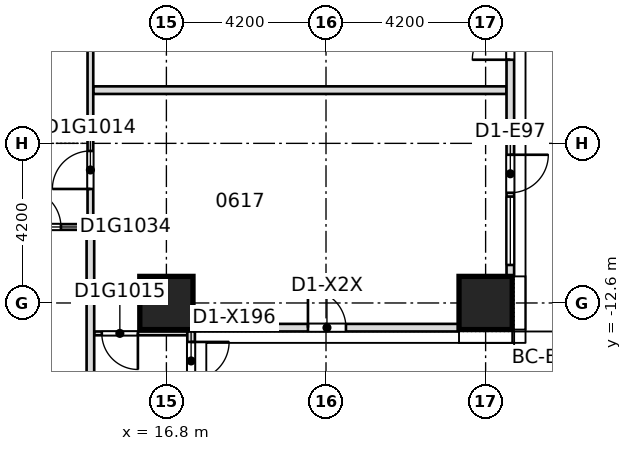
"""IFC4 building model, lengths in metres.
Left out: names, types, materials, properties, quantities, classifications, styles, units other than length and angle.
Written with IfcOpenShell. Run it as: python <this file> out.ifc"""

import sys

from ifc_helpers import new_model, si_unit, direction, frame, frame_2d, origin, origin_2d, place, context, subcontext, project, spatial, rectangle, extrude, element, fill, save


model = new_model("IFC4")
c1 = context("Model", 3, precision=1e-05, world=origin(), true_north=direction((0.0, 1.0)))
c2 = subcontext(c1, "Body", "Model", "MODEL_VIEW")
j1 = project(units=[si_unit("LENGTHUNIT", "METRE"), si_unit("PLANEANGLEUNIT", "RADIAN")], contexts=[c1])
p1 = place(None, origin())
s1 = spatial("IfcSite", under=j1, at=p1, CompositionType="ELEMENT")
p2 = place(p1, origin())
s2 = spatial("IfcBuilding", under=s1, at=p2, CompositionType="ELEMENT")
p3 = place(p2, frame((0.0, 0.0, 34.5)))
s3 = spatial("IfcBuildingStorey", under=s2, at=p3, CompositionType="ELEMENT", Elevation=34.5)
for number, where, z_axis, x_axis in (
    (1, (16.8, -12.6, -0.32), (0.0, 0.0, 1.0), (1.0, 0.0, 0.0)),
    (2, (25.2, -12.6, -0.32), (0.0, 0.0, 1.0), (1.0, 0.0, 0.0)),
):
    element("IfcColumn", number, at=place(p3, frame(where, z_axis=z_axis, x_axis=x_axis)), inside=s3, PredefinedType="COLUMN", context=c2, shape_type="SweptSolid", body=[
        extrude(rectangle(XDim=1.4, YDim=1.4, at=origin_2d()), origin(), (0.0, 0.0, 1.0), 3.45),
    ])
p4 = place(p3, frame((14.9, -13.4, 0.0), z_axis=(0.0, 0.0, 1.0), x_axis=(1.0, 0.0, 0.0)))
e3 = element("IfcWall", 3, at=p4, inside=s3, PredefinedType="PARTITIONING", context=c2, shape_type="SweptSolid", body=[
    extrude(rectangle(XDim=2.45, YDim=0.1, at=frame_2d((1.225, 0.0))), origin(), (0.0, 0.0, 1.0), 3.13),
])
p5 = place(p4, frame((0.2, 0.0, 0.0)))
e4 = element("IfcOpeningElement", 4, at=p5, cuts=e3, PredefinedType="OPENING", context=c2, shape_type="SweptSolid", body=[
    extrude(rectangle(XDim=0.95, YDim=2.1, at=frame_2d((0.475, 1.05))), frame((0.0, 0.06, 0.0), z_axis=(0.0, -1.0, 0.0), x_axis=(1.0, 0.0, 0.0)), (0.0, 0.0, 1.0), 0.12),
])
p6 = place(p3, frame((-14.9, -10.6, 0.0), z_axis=(0.0, 0.0, 1.0), x_axis=(1.0, 0.0, 0.0)))
e5 = element("IfcWall", 5, at=p6, inside=s3, PredefinedType="PARTITIONING", context=c2, shape_type="SweptSolid", body=[
    extrude(rectangle(XDim=29.8, YDim=0.15, at=frame_2d((14.9, 0.0))), origin(), (0.0, 0.0, 1.0), 3.13),
])
p7 = place(p6, frame((9.225, 0.0, 0.0)))
e6 = element("IfcOpeningElement", 6, at=p7, cuts=e5, PredefinedType="OPENING", context=c2, shape_type="SweptSolid", body=[
    extrude(rectangle(XDim=0.95, YDim=2.1, at=frame_2d((0.475, 1.05))), frame((0.0, 0.085, 0.0), z_axis=(0.0, -1.0, 0.0), x_axis=(1.0, 0.0, 0.0)), (0.0, 0.0, 1.0), 0.17),
])
p8 = place(p6, frame((19.625, 0.0, 0.0)))
e7 = element("IfcOpeningElement", 7, at=p8, cuts=e5, PredefinedType="OPENING", context=c2, shape_type="SweptSolid", body=[
    extrude(rectangle(XDim=0.95, YDim=2.1, at=frame_2d((0.475, 1.05))), frame((0.0, 0.085, 0.0), z_axis=(0.0, -1.0, 0.0), x_axis=(1.0, 0.0, 0.0)), (0.0, 0.0, 1.0), 0.17),
])
p9 = place(p6, frame((3.95, 0.0, 0.0)))
e8 = element("IfcOpeningElement", 8, at=p9, cuts=e5, PredefinedType="OPENING", context=c2, shape_type="SweptSolid", body=[
    extrude(rectangle(XDim=1.1, YDim=2.1, at=frame_2d((0.55, 1.05))), frame((0.0, 0.085, 0.0), z_axis=(0.0, -1.0, 0.0), x_axis=(1.0, 0.0, 0.0)), (0.0, 0.0, 1.0), 0.17),
])
p10 = place(p6, frame((15.5, 0.0, 0.0)))
e9 = element("IfcOpeningElement", 9, at=p10, cuts=e5, PredefinedType="OPENING", context=c2, shape_type="SweptSolid", body=[
    extrude(rectangle(XDim=1.1, YDim=2.1, at=frame_2d((0.55, 1.05))), frame((0.0, 0.085, 0.0), z_axis=(0.0, -1.0, 0.0), x_axis=(1.0, 0.0, 0.0)), (0.0, 0.0, 1.0), 0.17),
])
p11 = place(p6, frame((24.75, 0.0, 0.0)))
e10 = element("IfcOpeningElement", 10, at=p11, cuts=e5, PredefinedType="OPENING", context=c2, shape_type="SweptSolid", body=[
    extrude(rectangle(XDim=1.1, YDim=2.1, at=frame_2d((0.55, 1.05))), frame((0.0, 0.085, 0.0), z_axis=(0.0, -1.0, 0.0), x_axis=(1.0, 0.0, 0.0)), (0.0, 0.0, 1.0), 0.17),
])
p12 = place(p6, frame((0.875, 0.0, 0.0)))
e11 = element("IfcOpeningElement", 11, at=p12, cuts=e5, PredefinedType="OPENING", context=c2, shape_type="SweptSolid", body=[
    extrude(rectangle(XDim=1.0, YDim=2.1, at=frame_2d((0.5, 1.05))), frame((0.0, 0.085, 0.0), z_axis=(0.0, -1.0, 0.0), x_axis=(1.0, 0.0, 0.0)), (0.0, 0.0, 1.0), 0.17),
])
p13 = place(p6, frame((27.925, 0.0, 0.0)))
e12 = element("IfcOpeningElement", 12, at=p13, cuts=e5, PredefinedType="OPENING", context=c2, shape_type="SweptSolid", body=[
    extrude(rectangle(XDim=1.0, YDim=2.1, at=frame_2d((0.5, 1.05))), frame((0.0, 0.085, 0.0), z_axis=(0.0, -1.0, 0.0), x_axis=(1.0, 0.0, 0.0)), (0.0, 0.0, 1.0), 0.17),
])
p14 = place(p3, frame((14.875, -7.0, 0.0), z_axis=(0.0, 0.0, 1.0), x_axis=(1.0, 0.0, 0.0)))
e13 = element("IfcWall", 13, at=p14, inside=s3, PredefinedType="PARTITIONING", context=c2, shape_type="SweptSolid", body=[
    extrude(rectangle(XDim=10.875, YDim=0.2, at=frame_2d((5.438, 0.0))), origin(), (0.0, 0.0, 1.0), 3.13),
])
p15 = place(p3, frame((14.8, -19.9, 0.0), z_axis=(0.0, 0.0, 1.0), x_axis=(0.0, 1.0, 0.0)))
e14 = element("IfcWall", 14, at=p15, inside=s3, PredefinedType="PARTITIONING", context=c2, shape_type="SweptSolid", body=[
    extrude(rectangle(XDim=9.225, YDim=0.2, at=frame_2d((4.612, 0.0))), origin(), (0.0, 0.0, 1.0), 3.13),
])
p16 = place(p3, frame((14.8, -10.525, 0.0), z_axis=(0.0, 0.0, 1.0), x_axis=(0.0, 1.0, 0.0)))
e15 = element("IfcWall", 15, at=p16, inside=s3, PredefinedType="PARTITIONING", context=c2, shape_type="SweptSolid", body=[
    extrude(rectangle(XDim=23.825, YDim=0.15, at=frame_2d((11.913, 0.0))), origin(), (0.0, 0.0, 1.0), 3.13),
])
p17 = place(p16, frame((0.925, 0.0, 0.0)))
e16 = element("IfcOpeningElement", 16, at=p17, cuts=e15, PredefinedType="OPENING", context=c2, shape_type="SweptSolid", body=[
    extrude(rectangle(XDim=1.0, YDim=2.1, at=frame_2d((0.5, 1.05))), frame((0.0, 0.085, 0.0), z_axis=(0.0, -1.0, 0.0), x_axis=(1.0, 0.0, 0.0)), (0.0, 0.0, 1.0), 0.17),
])
p18 = place(p16, frame((15.9, 0.0, 0.0)))
e17 = element("IfcOpeningElement", 17, at=p18, cuts=e15, PredefinedType="OPENING", context=c2, shape_type="SweptSolid", body=[
    extrude(rectangle(XDim=1.0, YDim=2.1, at=frame_2d((0.5, 1.05))), frame((0.0, 0.085, 0.0), z_axis=(0.0, -1.0, 0.0), x_axis=(1.0, 0.0, 0.0)), (0.0, 0.0, 1.0), 0.17),
])
p19 = place(p16, frame((20.9, 0.0, 0.0)))
e18 = element("IfcOpeningElement", 18, at=p19, cuts=e15, PredefinedType="OPENING", context=c2, shape_type="SweptSolid", body=[
    extrude(rectangle(XDim=0.95, YDim=2.1, at=frame_2d((0.475, 1.05))), frame((0.0, 0.085, 0.0), z_axis=(0.0, -1.0, 0.0), x_axis=(1.0, 0.0, 0.0)), (0.0, 0.0, 1.0), 0.17),
])
p20 = place(p16, frame((9.975, 0.0, 0.0)))
e19 = element("IfcOpeningElement", 19, at=p20, cuts=e15, PredefinedType="OPENING", context=c2, shape_type="SweptSolid", body=[
    extrude(rectangle(XDim=1.1, YDim=2.1, at=frame_2d((0.55, 1.05))), frame((0.0, 0.085, 0.0), z_axis=(0.0, -1.0, 0.0), x_axis=(1.0, 0.0, 0.0)), (0.0, 0.0, 1.0), 0.17),
])
p21 = place(p16, frame((4.725, 0.0, 0.0)))
e20 = element("IfcOpeningElement", 20, at=p21, cuts=e15, PredefinedType="OPENING", context=c2, shape_type="SweptSolid", body=[
    extrude(rectangle(XDim=1.0, YDim=2.1, at=frame_2d((0.5, 1.05))), frame((0.0, 0.085, 0.0), z_axis=(0.0, -1.0, 0.0), x_axis=(1.0, 0.0, 0.0)), (0.0, 0.0, 1.0), 0.17),
])
p22 = place(p3, frame((17.45, -20.3, 0.0), z_axis=(0.0, 0.0, 1.0), x_axis=(0.0, 1.0, 0.0)))
e21 = element("IfcWall", 21, at=p22, inside=s3, PredefinedType="STANDARD", context=c2, shape_type="SweptSolid", body=[
    extrude(rectangle(XDim=6.95, YDim=0.2, at=frame_2d((3.475, 0.0))), origin(), (0.0, 0.0, 1.0), 3.13),
])
p23 = place(p22, frame((0.3, 0.0, 0.2)))
e22 = element("IfcOpeningElement", 22, at=p23, cuts=e21, PredefinedType="OPENING", context=c2, shape_type="SweptSolid", body=[
    extrude(rectangle(XDim=1.8, YDim=2.65, at=frame_2d((0.9, 1.325))), frame((0.0, 0.11, 0.0), z_axis=(0.0, -1.0, 0.0), x_axis=(1.0, 0.0, 0.0)), (0.0, 0.0, 1.0), 0.22),
])
p24 = place(p22, frame((2.2, 0.0, 0.0)))
e23 = element("IfcOpeningElement", 23, at=p24, cuts=e21, PredefinedType="OPENING", context=c2, shape_type="SweptSolid", body=[
    extrude(rectangle(XDim=1.0, YDim=2.4, at=frame_2d((0.5, 1.2))), frame((0.0, 0.11, 0.0), z_axis=(0.0, -1.0, 0.0), x_axis=(1.0, 0.0, 0.0)), (0.0, 0.0, 1.0), 0.22),
])
p25 = place(p22, frame((3.775, 0.0, 0.2)))
e24 = element("IfcOpeningElement", 24, at=p25, cuts=e21, PredefinedType="OPENING", context=c2, shape_type="SweptSolid", body=[
    extrude(rectangle(XDim=1.8, YDim=2.65, at=frame_2d((0.9, 1.325))), frame((0.0, 0.11, 0.0), z_axis=(0.0, -1.0, 0.0), x_axis=(1.0, 0.0, 0.0)), (0.0, 0.0, 1.0), 0.22),
])
p26 = place(p22, frame((5.675, 0.0, 0.0)))
e25 = element("IfcOpeningElement", 25, at=p26, cuts=e21, PredefinedType="OPENING", context=c2, shape_type="SweptSolid", body=[
    extrude(rectangle(XDim=1.0, YDim=2.4, at=frame_2d((0.5, 1.2))), frame((0.0, 0.11, 0.0), z_axis=(0.0, -1.0, 0.0), x_axis=(1.0, 0.0, 0.0)), (0.0, 0.0, 1.0), 0.22),
])
p27 = place(p3, frame((17.55, -13.25, 0.0), z_axis=(0.0, 0.0, 1.0), x_axis=(1.0, 0.0, 0.0)))
e26 = element("IfcWall", 26, at=p27, inside=s3, PredefinedType="STANDARD", context=c2, shape_type="SweptSolid", body=[
    extrude(rectangle(XDim=6.95, YDim=0.2, at=frame_2d((3.475, 0.0))), origin(), (0.0, 0.0, 1.0), 3.13),
])
p28 = place(p27, frame((2.975, 0.0, 0.0)))
e27 = element("IfcOpeningElement", 27, at=p28, cuts=e26, PredefinedType="OPENING", context=c2, shape_type="SweptSolid", body=[
    extrude(rectangle(XDim=1.0, YDim=2.4, at=frame_2d((0.5, 1.2))), frame((0.0, 0.11, 0.0), z_axis=(0.0, -1.0, 0.0), x_axis=(1.0, 0.0, 0.0)), (0.0, 0.0, 1.0), 0.22),
])
p29 = place(p3, frame((25.85, -11.9, 0.0), z_axis=(0.0, 0.0, 1.0), x_axis=(0.0, 1.0, 0.0)))
e28 = element("IfcWall", 28, at=p29, inside=s3, PredefinedType="STANDARD", context=c2, shape_type="SweptSolid", body=[
    extrude(rectangle(XDim=7.0, YDim=0.2, at=frame_2d((3.5, 0.0))), origin(), (0.0, 0.0, 1.0), 3.13),
])
p30 = place(p29, frame((0.3, 0.0, 0.2)))
e29 = element("IfcOpeningElement", 29, at=p30, cuts=e28, PredefinedType="OPENING", context=c2, shape_type="SweptSolid", body=[
    extrude(rectangle(XDim=1.8, YDim=2.65, at=frame_2d((0.9, 1.325))), frame((0.0, 0.11, 0.0), z_axis=(0.0, -1.0, 0.0), x_axis=(1.0, 0.0, 0.0)), (0.0, 0.0, 1.0), 0.22),
])
p31 = place(p29, frame((2.2, 0.0, 0.0)))
e30 = element("IfcOpeningElement", 30, at=p31, cuts=e28, PredefinedType="OPENING", context=c2, shape_type="SweptSolid", body=[
    extrude(rectangle(XDim=1.0, YDim=2.4, at=frame_2d((0.5, 1.2))), frame((0.0, 0.11, 0.0), z_axis=(0.0, -1.0, 0.0), x_axis=(1.0, 0.0, 0.0)), (0.0, 0.0, 1.0), 0.22),
])
p32 = place(p29, frame((5.7, 0.0, 0.0)))
e31 = element("IfcOpeningElement", 31, at=p32, cuts=e28, PredefinedType="OPENING", context=c2, shape_type="SweptSolid", body=[
    extrude(rectangle(XDim=1.0, YDim=2.4, at=frame_2d((0.5, 1.2))), frame((0.0, 0.11, 0.0), z_axis=(0.0, -1.0, 0.0), x_axis=(1.0, 0.0, 0.0)), (0.0, 0.0, 1.0), 0.22),
])
p33 = place(p17, origin())
e32 = element("IfcDoor", 32, at=p33, inside=s3, OperationType="SINGLE_SWING_RIGHT", PredefinedType="DOOR", context=c2, shape_type="SweptSolid", body=[
    extrude(rectangle(XDim=1.0, YDim=2.1, at=frame_2d((0.5, 1.05))), frame((0.0, 0.025, 0.0), z_axis=(0.0, -1.0, 0.0), x_axis=(1.0, 0.0, 0.0)), (0.0, 0.0, 1.0), 0.05),
])
fill(e16, e32)
p34 = place(p5, origin())
e33 = element("IfcDoor", 33, at=p34, inside=s3, OperationType="SINGLE_SWING_RIGHT", PredefinedType="DOOR", context=c2, shape_type="SweptSolid", body=[
    extrude(rectangle(XDim=0.95, YDim=2.1, at=frame_2d((0.475, 1.05))), frame((0.0, 0.025, 0.0), z_axis=(0.0, -1.0, 0.0), x_axis=(1.0, 0.0, 0.0)), (0.0, 0.0, 1.0), 0.05),
])
fill(e4, e33)
p35 = place(p13, origin())
e34 = element("IfcDoor", 34, at=p35, inside=s3, OperationType="SINGLE_SWING_LEFT", PredefinedType="DOOR", context=c2, shape_type="SweptSolid", body=[
    extrude(rectangle(XDim=1.0, YDim=2.1, at=frame_2d((0.5, 1.05))), frame((0.0, 0.025, 0.0), z_axis=(0.0, -1.0, 0.0), x_axis=(1.0, 0.0, 0.0)), (0.0, 0.0, 1.0), 0.05),
])
fill(e12, e34)
p36 = place(p26, origin())
e35 = element("IfcDoor", 35, at=p36, inside=s3, OperationType="SINGLE_SWING_LEFT", PredefinedType="DOOR", context=c2, shape_type="SweptSolid", body=[
    extrude(rectangle(XDim=1.0, YDim=2.4, at=frame_2d((0.5, 1.2))), frame((0.0, 0.025, 0.0), z_axis=(0.0, -1.0, 0.0), x_axis=(1.0, 0.0, 0.0)), (0.0, 0.0, 1.0), 0.05),
])
fill(e25, e35)
p37 = place(p28, origin())
e36 = element("IfcDoor", 36, at=p37, inside=s3, OperationType="SINGLE_SWING_LEFT", PredefinedType="DOOR", context=c2, shape_type="SweptSolid", body=[
    extrude(rectangle(XDim=1.0, YDim=2.4, at=frame_2d((0.5, 1.2))), frame((0.0, 0.025, 0.0), z_axis=(0.0, -1.0, 0.0), x_axis=(1.0, 0.0, 0.0)), (0.0, 0.0, 1.0), 0.05),
])
fill(e27, e36)
p38 = place(p30, origin())
e37 = element("IfcWindow", 37, at=p38, inside=s3, PartitioningType="SINGLE_PANEL", PredefinedType="WINDOW", context=c2, shape_type="SweptSolid", body=[
    extrude(rectangle(XDim=1.8, YDim=2.65, at=frame_2d((0.9, 1.325))), frame((0.0, 0.03, 0.0), z_axis=(0.0, -1.0, 0.0), x_axis=(1.0, 0.0, 0.0)), (0.0, 0.0, 1.0), 0.06),
])
fill(e29, e37)
p39 = place(p31, origin())
e38 = element("IfcDoor", 38, at=p39, inside=s3, OperationType="SINGLE_SWING_LEFT", PredefinedType="DOOR", context=c2, shape_type="SweptSolid", body=[
    extrude(rectangle(XDim=1.0, YDim=2.4, at=frame_2d((0.5, 1.2))), frame((0.0, 0.025, 0.0), z_axis=(0.0, -1.0, 0.0), x_axis=(1.0, 0.0, 0.0)), (0.0, 0.0, 1.0), 0.05),
])
fill(e30, e38)
p40 = place(p32, origin())
e39 = element("IfcDoor", 39, at=p40, inside=s3, OperationType="SINGLE_SWING_LEFT", PredefinedType="DOOR", context=c2, shape_type="SweptSolid", body=[
    extrude(rectangle(XDim=1.0, YDim=2.4, at=frame_2d((0.5, 1.2))), frame((0.0, 0.025, 0.0), z_axis=(0.0, -1.0, 0.0), x_axis=(1.0, 0.0, 0.0)), (0.0, 0.0, 1.0), 0.05),
])
fill(e31, e39)
save(model, sys.argv[1])
